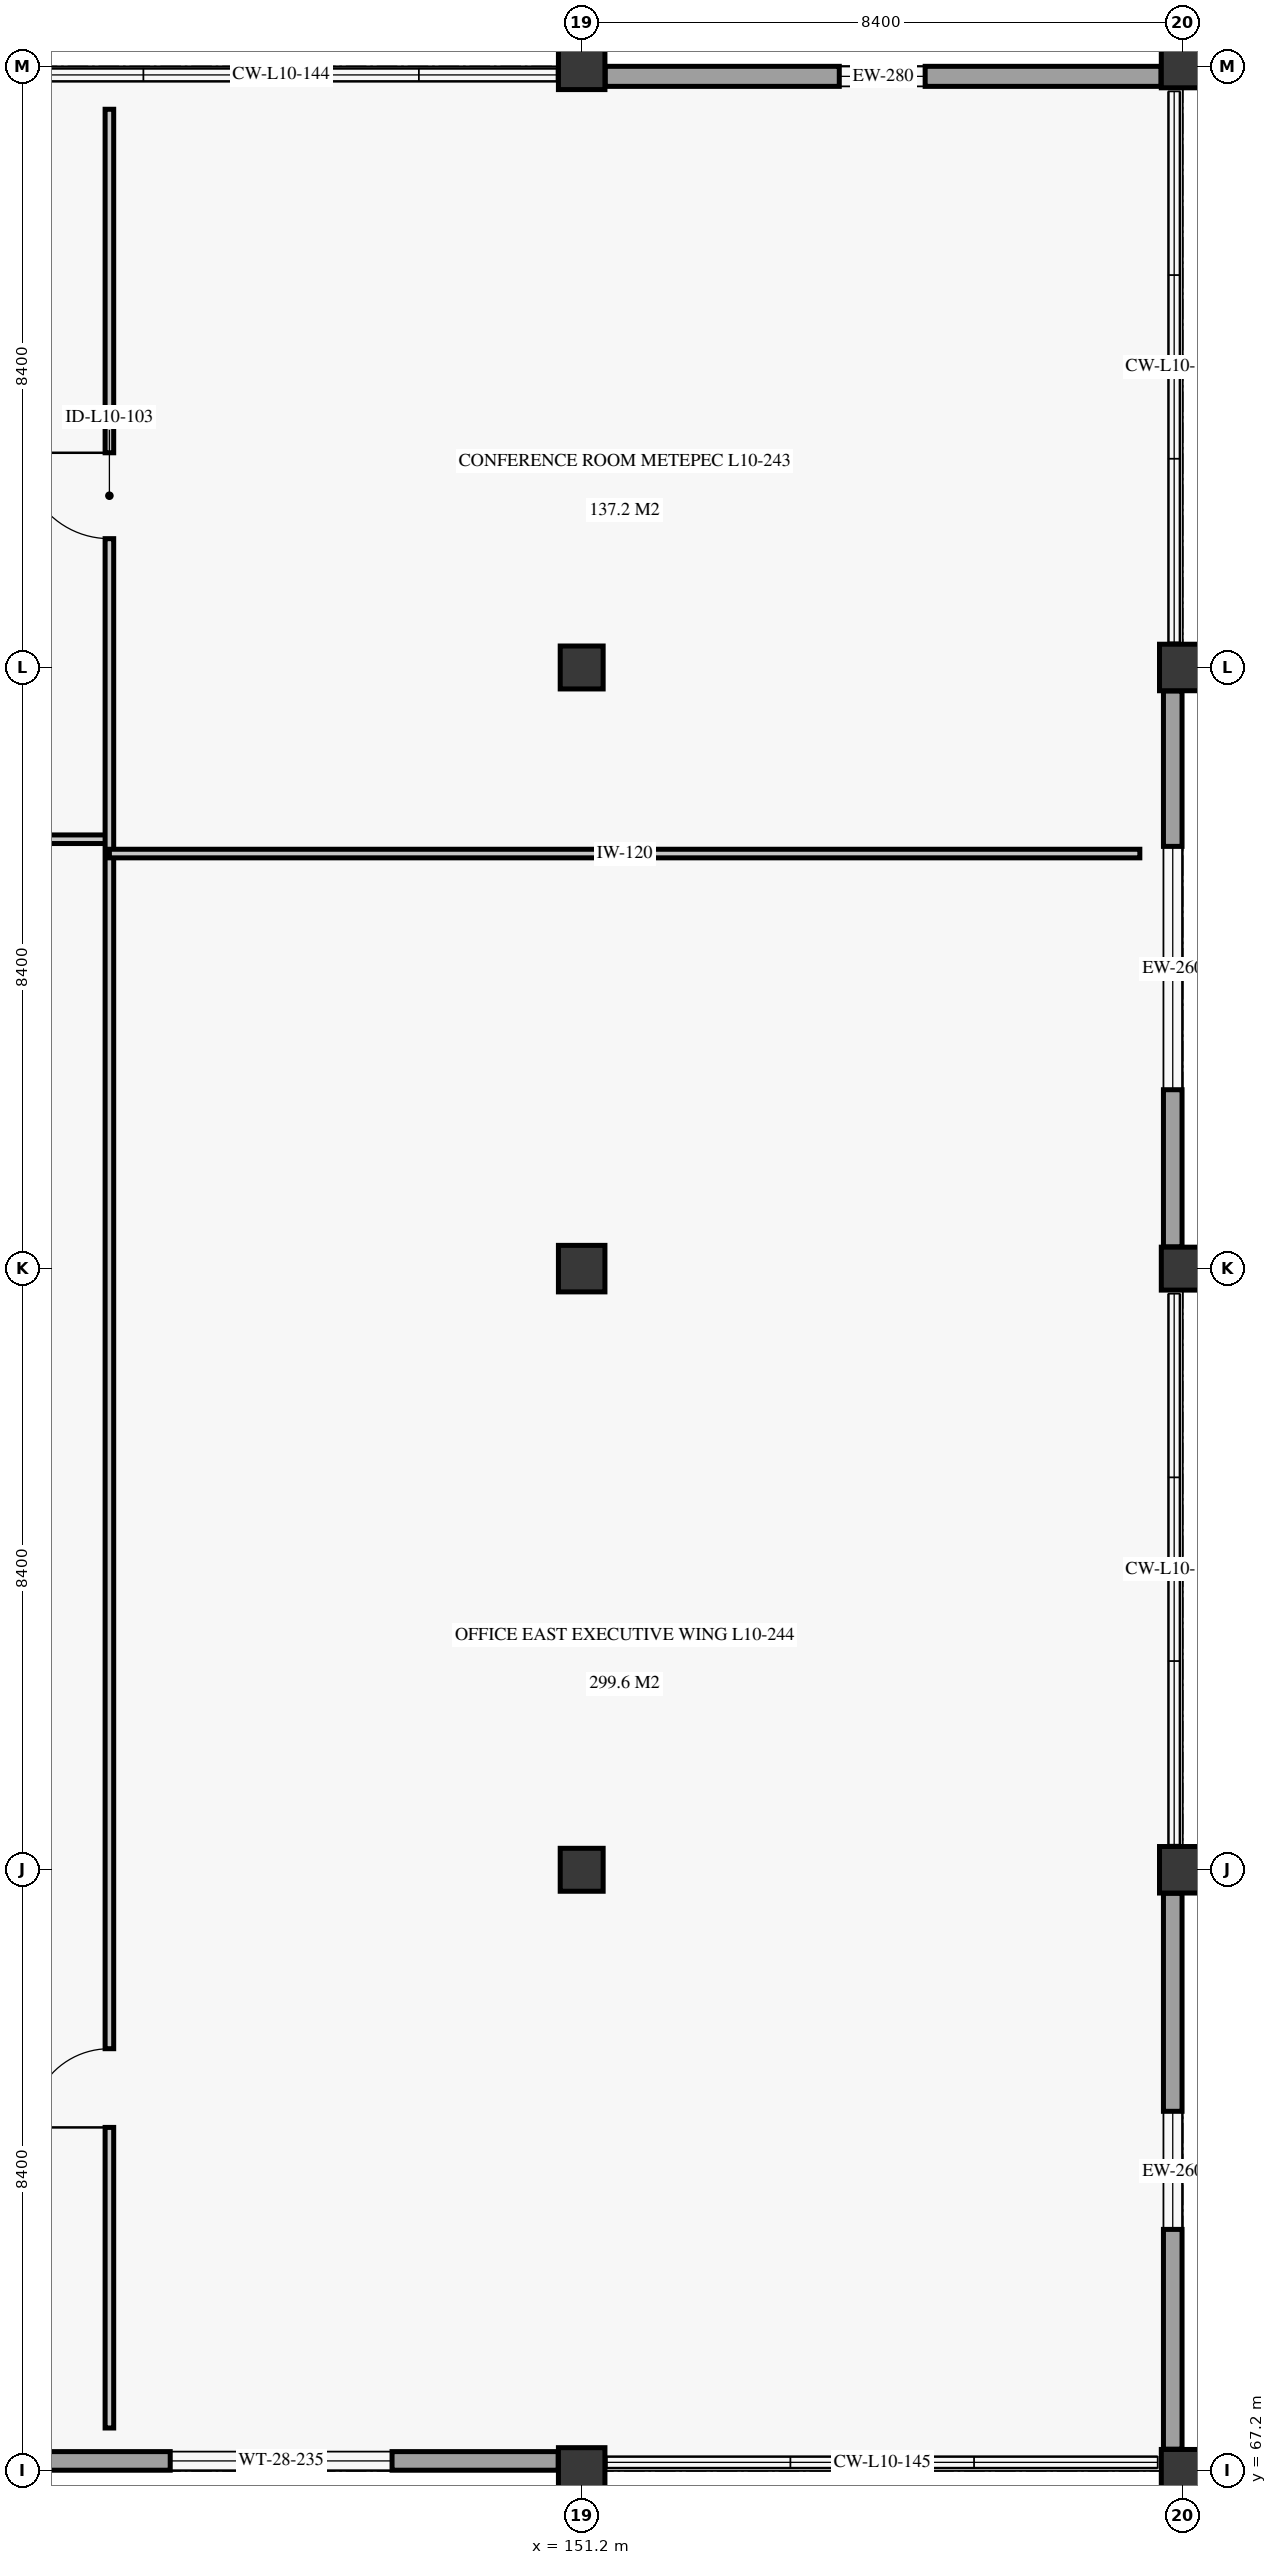
"""IFC4 building model, lengths in metres.
Left out: names, types, materials, properties, quantities, classifications, styles, units other than length and angle.
Written with IfcOpenShell. Run it as: python <this file> out.ifc"""

import sys

from ifc_helpers import new_model, si_unit, direction, frame, frame_2d, origin, origin_2d, place, context, subcontext, project, spatial, rectangle, extrude, element, fill, save


model = new_model("IFC4")
c1 = context("Model", 3, precision=1e-05, world=origin(), true_north=direction((0.0, 1.0)))
c2 = subcontext(c1, "Body", "Model", "MODEL_VIEW")
j1 = project(units=[si_unit("LENGTHUNIT", "METRE"), si_unit("PLANEANGLEUNIT", "RADIAN")], contexts=[c1])
p1 = place(None, origin())
s1 = spatial("IfcSite", under=j1, at=p1, CompositionType="ELEMENT")
p2 = place(p1, origin())
s2 = spatial("IfcBuilding", under=s1, at=p2, CompositionType="ELEMENT")
p3 = place(p2, frame((0.0, 0.0, 42.7)))
s3 = spatial("IfcBuildingStorey", under=s2, at=p3, CompositionType="ELEMENT", Elevation=42.7)
p4 = place(p3, frame((151.2, 67.2, 0.0), z_axis=(0.0, 0.0, 1.0), x_axis=(1.0, 0.0, 0.0)))
e1 = element("IfcColumn", 1, at=p4, inside=s3, PredefinedType="COLUMN", context=c2, shape_type="SweptSolid", body=[
    extrude(rectangle(XDim=0.65, YDim=0.65, at=origin_2d()), origin(), (0.0, 0.0, 1.0), 3.72),
])
p5 = place(p3, frame((151.2, 75.6, 0.0), z_axis=(0.0, 0.0, 1.0), x_axis=(1.0, 0.0, 0.0)))
e2 = element("IfcColumn", 2, at=p5, inside=s3, PredefinedType="COLUMN", context=c2, shape_type="SweptSolid", body=[
    extrude(rectangle(XDim=0.6, YDim=0.6, at=origin_2d()), origin(), (0.0, 0.0, 1.0), 3.72),
])
p6 = place(p3, frame((151.2, 84.0, 0.0), z_axis=(0.0, 0.0, 1.0), x_axis=(1.0, 0.0, 0.0)))
e3 = element("IfcColumn", 3, at=p6, inside=s3, PredefinedType="COLUMN", context=c2, shape_type="SweptSolid", body=[
    extrude(rectangle(XDim=0.65, YDim=0.65, at=origin_2d()), origin(), (0.0, 0.0, 1.0), 3.72),
])
p7 = place(p3, frame((151.2, 92.4, 0.0), z_axis=(0.0, 0.0, 1.0), x_axis=(1.0, 0.0, 0.0)))
e4 = element("IfcColumn", 4, at=p7, inside=s3, PredefinedType="COLUMN", context=c2, shape_type="SweptSolid", body=[
    extrude(rectangle(XDim=0.6, YDim=0.6, at=origin_2d()), origin(), (0.0, 0.0, 1.0), 3.72),
])
p8 = place(p3, frame((151.2, 100.8, 0.0), z_axis=(0.0, 0.0, 1.0), x_axis=(1.0, 0.0, 0.0)))
e5 = element("IfcColumn", 5, at=p8, inside=s3, PredefinedType="COLUMN", context=c2, shape_type="SweptSolid", body=[
    extrude(rectangle(XDim=0.65, YDim=0.65, at=origin_2d()), origin(), (0.0, 0.0, 1.0), 3.72),
])
p9 = place(p3, frame((159.6, 67.2, 0.0), z_axis=(0.0, 0.0, 1.0), x_axis=(1.0, 0.0, 0.0)))
e6 = element("IfcColumn", 6, at=p9, inside=s3, PredefinedType="COLUMN", context=c2, shape_type="SweptSolid", body=[
    extrude(rectangle(XDim=0.6, YDim=0.6, at=origin_2d()), origin(), (0.0, 0.0, 1.0), 3.72),
])
p10 = place(p3, frame((159.6, 75.6, 0.0), z_axis=(0.0, 0.0, 1.0), x_axis=(1.0, 0.0, 0.0)))
e7 = element("IfcColumn", 7, at=p10, inside=s3, PredefinedType="COLUMN", context=c2, shape_type="SweptSolid", body=[
    extrude(rectangle(XDim=0.65, YDim=0.65, at=origin_2d()), origin(), (0.0, 0.0, 1.0), 3.72),
])
p11 = place(p3, frame((159.6, 84.0, 0.0), z_axis=(0.0, 0.0, 1.0), x_axis=(1.0, 0.0, 0.0)))
e8 = element("IfcColumn", 8, at=p11, inside=s3, PredefinedType="COLUMN", context=c2, shape_type="SweptSolid", body=[
    extrude(rectangle(XDim=0.6, YDim=0.6, at=origin_2d()), origin(), (0.0, 0.0, 1.0), 3.72),
])
p12 = place(p3, frame((159.6, 92.4, 0.0), z_axis=(0.0, 0.0, 1.0), x_axis=(1.0, 0.0, 0.0)))
e9 = element("IfcColumn", 9, at=p12, inside=s3, PredefinedType="COLUMN", context=c2, shape_type="SweptSolid", body=[
    extrude(rectangle(XDim=0.65, YDim=0.65, at=origin_2d()), origin(), (0.0, 0.0, 1.0), 3.72),
])
p13 = place(p3, frame((159.6, 100.8, 0.0), z_axis=(0.0, 0.0, 1.0), x_axis=(1.0, 0.0, 0.0)))
e10 = element("IfcColumn", 10, at=p13, inside=s3, PredefinedType="COLUMN", context=c2, shape_type="SweptSolid", body=[
    extrude(rectangle(XDim=0.6, YDim=0.6, at=origin_2d()), origin(), (0.0, 0.0, 1.0), 3.72),
])
p14 = place(p3, frame((143.104, 67.34, 0.0), z_axis=(0.0, 0.0, 1.0), x_axis=(1.0, 0.0, 0.0)))
e11 = element("IfcWall", 11, at=p14, inside=s3, PredefinedType="SOLIDWALL", context=c2, shape_type="SweptSolid", body=[
    extrude(rectangle(XDim=7.768, YDim=0.26, at=frame_2d((3.884, 0.0))), origin(), (0.0, 0.0, 1.0), 3.04),
])
p15 = place(p14, frame((2.346, 0.0, 0.85)))
e12 = element("IfcOpeningElement", 12, at=p15, cuts=e11, PredefinedType="OPENING", context=c2, shape_type="SweptSolid", body=[
    extrude(rectangle(XDim=3.1, YDim=1.85, at=frame_2d((1.55, 0.925))), frame((0.0, 0.14, 0.0), z_axis=(0.0, -1.0, 0.0), x_axis=(1.0, 0.0, 0.0)), (0.0, 0.0, 1.0), 0.28),
])
p16 = place(p3, frame((151.528, 100.66, 0.0), z_axis=(0.0, 0.0, 1.0), x_axis=(1.0, 0.0, 0.0)))
e13 = element("IfcWall", 13, at=p16, inside=s3, PredefinedType="SOLIDWALL", context=c2, shape_type="SweptSolid", body=[
    extrude(rectangle(XDim=7.768, YDim=0.28, at=frame_2d((3.884, 0.0))), origin(), (0.0, 0.0, 1.0), 3.04),
])
p17 = place(p16, frame((3.272, 0.0, 0.85)))
e14 = element("IfcOpeningElement", 14, at=p17, cuts=e13, PredefinedType="OPENING", context=c2, shape_type="SweptSolid", body=[
    extrude(rectangle(XDim=1.2, YDim=1.6, at=frame_2d((0.6, 0.8))), frame((0.0, 0.15, 0.0), z_axis=(0.0, -1.0, 0.0), x_axis=(1.0, 0.0, 0.0)), (0.0, 0.0, 1.0), 0.3),
])
p18 = place(p3, frame((159.46, 67.504, 0.0), z_axis=(0.0, 0.0, 1.0), x_axis=(0.0, 1.0, 0.0)))
e15 = element("IfcWall", 15, at=p18, inside=s3, PredefinedType="SOLIDWALL", context=c2, shape_type="SweptSolid", body=[
    extrude(rectangle(XDim=7.768, YDim=0.26, at=frame_2d((3.884, 0.0))), origin(), (0.0, 0.0, 1.0), 3.04),
])
p19 = place(p18, frame((3.071, 0.0, 0.85)))
e16 = element("IfcOpeningElement", 16, at=p19, cuts=e15, PredefinedType="OPENING", context=c2, shape_type="SweptSolid", body=[
    extrude(rectangle(XDim=1.65, YDim=1.75, at=frame_2d((0.825, 0.875))), frame((0.0, 0.14, 0.0), z_axis=(0.0, -1.0, 0.0), x_axis=(1.0, 0.0, 0.0)), (0.0, 0.0, 1.0), 0.28),
])
p20 = place(p3, frame((159.46, 84.304, 0.0), z_axis=(0.0, 0.0, 1.0), x_axis=(0.0, 1.0, 0.0)))
e17 = element("IfcWall", 17, at=p20, inside=s3, PredefinedType="SOLIDWALL", context=c2, shape_type="SweptSolid", body=[
    extrude(rectangle(XDim=7.768, YDim=0.26, at=frame_2d((3.884, 0.0))), origin(), (0.0, 0.0, 1.0), 3.04),
])
p21 = place(p20, frame((2.196, 0.0, 0.85)))
e18 = element("IfcOpeningElement", 18, at=p21, cuts=e17, PredefinedType="OPENING", context=c2, shape_type="SweptSolid", body=[
    extrude(rectangle(XDim=3.4, YDim=1.9, at=frame_2d((1.7, 0.95))), frame((0.0, 0.14, 0.0), z_axis=(0.0, -1.0, 0.0), x_axis=(1.0, 0.0, 0.0)), (0.0, 0.0, 1.0), 0.28),
])
p22 = place(p3, frame((118.2, 90.0, 0.0), z_axis=(0.0, 0.0, 1.0), x_axis=(1.0, 0.0, 0.0)))
e19 = element("IfcWall", 19, at=p22, inside=s3, PredefinedType="PARTITIONING", context=c2, shape_type="SweptSolid", body=[
    extrude(rectangle(XDim=26.4, YDim=0.12, at=frame_2d((13.2, 0.0))), origin(), (0.0, 0.0, 1.0), 3.34),
])
p23 = place(p22, frame((3.2, 0.0, 0.0)))
e20 = element("IfcOpeningElement", 20, at=p23, cuts=e19, PredefinedType="OPENING", context=c2, shape_type="SweptSolid", body=[
    extrude(rectangle(XDim=1.4, YDim=2.35, at=frame_2d((0.7, 1.175))), frame((0.0, 0.07, 0.0), z_axis=(0.0, -1.0, 0.0), x_axis=(1.0, 0.0, 0.0)), (0.0, 0.0, 1.0), 0.14),
])
p24 = place(p22, frame((21.0, 0.0, 0.0)))
e21 = element("IfcOpeningElement", 21, at=p24, cuts=e19, PredefinedType="OPENING", context=c2, shape_type="SweptSolid", body=[
    extrude(rectangle(XDim=1.4, YDim=2.35, at=frame_2d((0.7, 1.175))), frame((0.0, 0.07, 0.0), z_axis=(0.0, -1.0, 0.0), x_axis=(1.0, 0.0, 0.0)), (0.0, 0.0, 1.0), 0.14),
])
p25 = place(p3, frame((144.6, 67.8, 0.0), z_axis=(0.0, 0.0, 1.0), x_axis=(0.0, 1.0, 0.0)))
e22 = element("IfcWall", 22, at=p25, inside=s3, PredefinedType="PARTITIONING", context=c2, shape_type="SweptSolid", body=[
    extrude(rectangle(XDim=32.4, YDim=0.12, at=frame_2d((16.2, 0.0))), origin(), (0.0, 0.0, 1.0), 3.34),
])
p26 = place(p25, frame((4.2, 0.0, 0.0)))
e23 = element("IfcOpeningElement", 23, at=p26, cuts=e22, PredefinedType="OPENING", context=c2, shape_type="SweptSolid", body=[
    extrude(rectangle(XDim=1.1, YDim=2.15, at=frame_2d((0.55, 1.075))), frame((0.0, 0.07, 0.0), z_axis=(0.0, -1.0, 0.0), x_axis=(1.0, 0.0, 0.0)), (0.0, 0.0, 1.0), 0.14),
])
p27 = place(p25, frame((26.4, 0.0, 0.0)))
e24 = element("IfcOpeningElement", 24, at=p27, cuts=e22, PredefinedType="OPENING", context=c2, shape_type="SweptSolid", body=[
    extrude(rectangle(XDim=1.2, YDim=2.3, at=frame_2d((0.6, 1.15))), frame((0.0, 0.07, 0.0), z_axis=(0.0, -1.0, 0.0), x_axis=(1.0, 0.0, 0.0)), (0.0, 0.0, 1.0), 0.14),
])
p28 = place(p3, frame((144.6, 89.8, 0.0), z_axis=(0.0, 0.0, 1.0), x_axis=(1.0, 0.0, 0.0)))
e25 = element("IfcWall", 25, at=p28, inside=s3, PredefinedType="PARTITIONING", context=c2, shape_type="SweptSolid", body=[
    extrude(rectangle(XDim=14.4, YDim=0.12, at=frame_2d((7.2, 0.0))), origin(), (0.0, 0.0, 1.0), 3.34),
])
p29 = place(p15, origin())
e26 = element("IfcWindow", 26, at=p29, inside=s3, PartitioningType="SINGLE_PANEL", PredefinedType="WINDOW", context=c2, shape_type="SweptSolid", body=[
    extrude(rectangle(XDim=3.1, YDim=1.85, at=frame_2d((1.55, 0.925))), frame((0.0, 0.03, 0.0), z_axis=(0.0, -1.0, 0.0), x_axis=(1.0, 0.0, 0.0)), (0.0, 0.0, 1.0), 0.06),
])
fill(e12, e26)
p30 = place(p17, origin())
e27 = element("IfcWindow", 27, at=p30, inside=s3, PartitioningType="SINGLE_PANEL", PredefinedType="WINDOW", context=c2, shape_type="SweptSolid", body=[
    extrude(rectangle(XDim=1.2, YDim=1.6, at=frame_2d((0.6, 0.8))), frame((0.0, 0.03, 0.0), z_axis=(0.0, -1.0, 0.0), x_axis=(1.0, 0.0, 0.0)), (0.0, 0.0, 1.0), 0.06),
])
fill(e14, e27)
p31 = place(p19, origin())
e28 = element("IfcWindow", 28, at=p31, inside=s3, PartitioningType="SINGLE_PANEL", PredefinedType="WINDOW", context=c2, shape_type="SweptSolid", body=[
    extrude(rectangle(XDim=1.65, YDim=1.75, at=frame_2d((0.825, 0.875))), frame((0.0, 0.03, 0.0), z_axis=(0.0, -1.0, 0.0), x_axis=(1.0, 0.0, 0.0)), (0.0, 0.0, 1.0), 0.06),
])
fill(e16, e28)
p32 = place(p21, origin())
e29 = element("IfcWindow", 29, at=p32, inside=s3, PartitioningType="SINGLE_PANEL", PredefinedType="WINDOW", context=c2, shape_type="SweptSolid", body=[
    extrude(rectangle(XDim=3.4, YDim=1.9, at=frame_2d((1.7, 0.95))), frame((0.0, 0.03, 0.0), z_axis=(0.0, -1.0, 0.0), x_axis=(1.0, 0.0, 0.0)), (0.0, 0.0, 1.0), 0.06),
])
fill(e18, e29)
p33 = place(p26, origin())
e30 = element("IfcDoor", 30, at=p33, inside=s3, OperationType="SINGLE_SWING_LEFT", PredefinedType="DOOR", context=c2, shape_type="SweptSolid", body=[
    extrude(rectangle(XDim=1.1, YDim=2.15, at=frame_2d((0.55, 1.075))), frame((0.0, 0.025, 0.0), z_axis=(0.0, -1.0, 0.0), x_axis=(1.0, 0.0, 0.0)), (0.0, 0.0, 1.0), 0.05),
])
fill(e23, e30)
p34 = place(p27, origin())
e31 = element("IfcDoor", 31, at=p34, inside=s3, OperationType="SINGLE_SWING_RIGHT", PredefinedType="DOOR", context=c2, shape_type="SweptSolid", body=[
    extrude(rectangle(XDim=1.2, YDim=2.3, at=frame_2d((0.6, 1.15))), frame((0.0, 0.025, 0.0), z_axis=(0.0, -1.0, 0.0), x_axis=(1.0, 0.0, 0.0)), (0.0, 0.0, 1.0), 0.05),
])
fill(e24, e31)
save(model, sys.argv[1])
